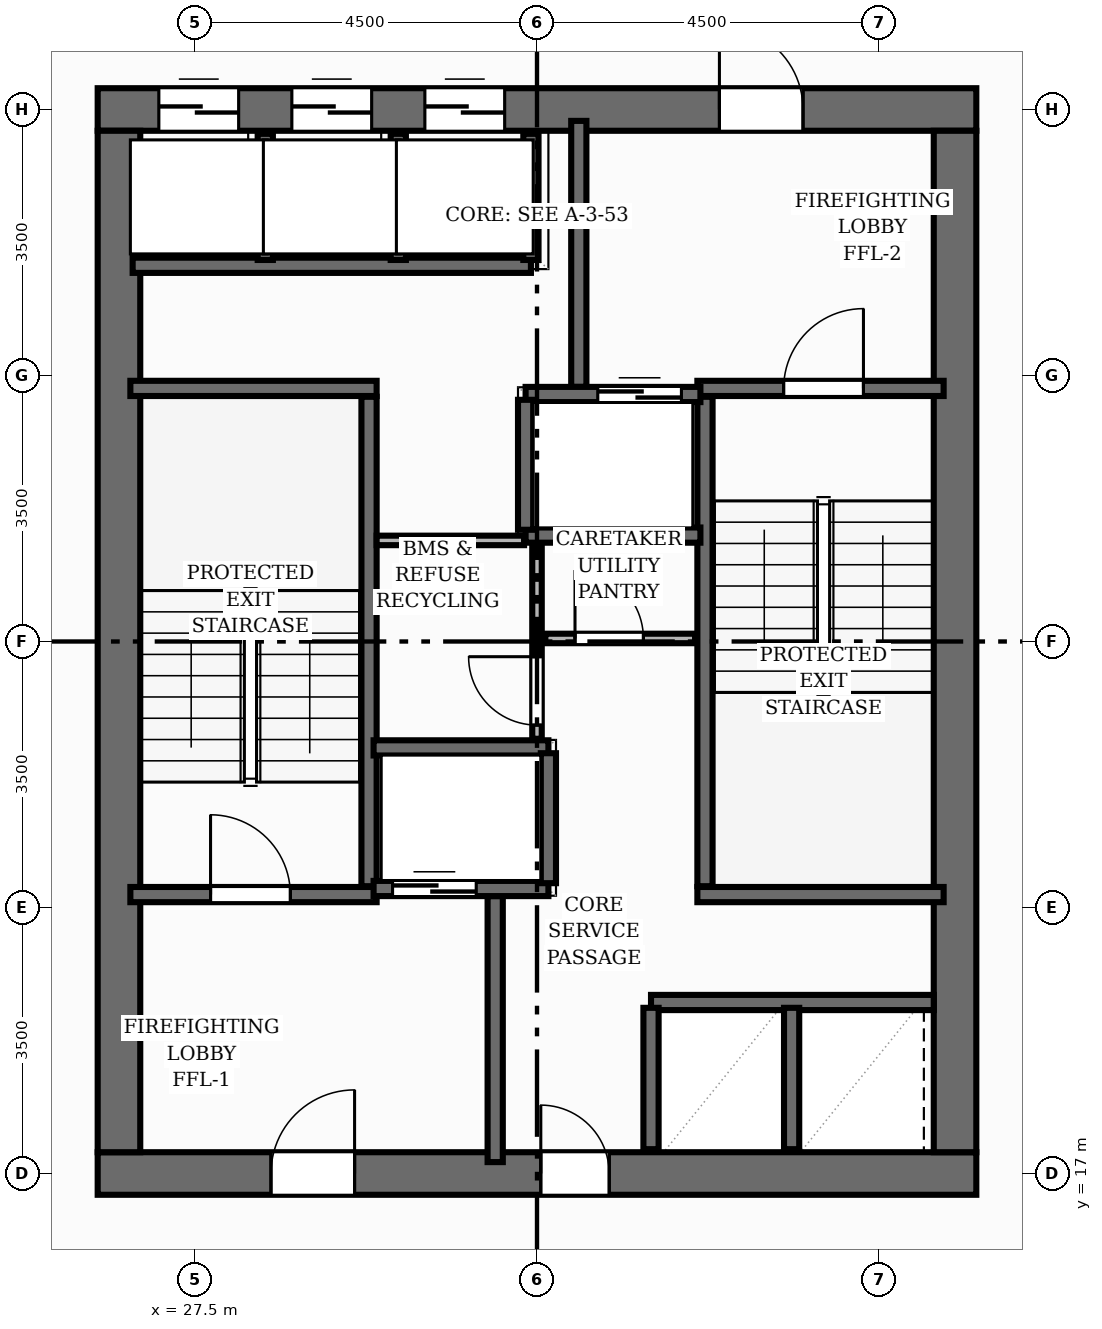
"""IFC4 building model, lengths in metres.
Left out: names, types, materials, properties, quantities, classifications, styles, units other than length and angle.
Written with IfcOpenShell. Run it as: python <this file> out.ifc"""

import sys

from ifc_helpers import new_model, si_unit, direction, frame, frame_2d, origin, place, context, subcontext, project, spatial, rectangle, extrude, element, fill, save


model = new_model("IFC4")
c1 = context("Model", 3, precision=1e-05, world=origin(), true_north=direction((0.0, 1.0)))
c2 = subcontext(c1, "Body", "Model", "MODEL_VIEW")
j1 = project(units=[si_unit("LENGTHUNIT", "METRE"), si_unit("PLANEANGLEUNIT", "RADIAN")], contexts=[c1])
p1 = place(None, origin())
s1 = spatial("IfcSite", under=j1, at=p1, CompositionType="ELEMENT")
p2 = place(p1, origin())
s2 = spatial("IfcBuilding", under=s1, at=p2, CompositionType="ELEMENT")
p3 = place(p2, frame((0.0, 0.0, 223.84)))
s3 = spatial("IfcBuildingStorey", under=s2, at=p3, CompositionType="ELEMENT", Elevation=223.84)
p4 = place(p3, frame((26.22, 17.0, 0.0), z_axis=(0.0, 0.0, 1.0), x_axis=(1.0, 0.0, 0.0)))
e1 = element("IfcWall", 1, at=p4, inside=s3, PredefinedType="SHEAR", context=c2, shape_type="SweptSolid", body=[
    extrude(rectangle(XDim=11.56, YDim=0.56, at=frame_2d((5.78, 0.0))), origin(), (0.0, 0.0, 1.0), 3.2),
])
p5 = place(p4, frame((2.28, 0.0, 0.0)))
e2 = element("IfcOpeningElement", 2, at=p5, cuts=e1, PredefinedType="OPENING", context=c2, shape_type="SweptSolid", body=[
    extrude(rectangle(XDim=1.1, YDim=2.15, at=frame_2d((0.55, 1.075))), frame((0.0, 0.29, 0.0), z_axis=(0.0, -1.0, 0.0), x_axis=(1.0, 0.0, 0.0)), (0.0, 0.0, 1.0), 0.58),
])
p6 = place(p4, frame((5.83, 0.0, 0.0)))
e3 = element("IfcOpeningElement", 3, at=p6, cuts=e1, PredefinedType="OPENING", context=c2, shape_type="SweptSolid", body=[
    extrude(rectangle(XDim=0.9, YDim=2.1, at=frame_2d((0.45, 1.05))), frame((0.0, 0.29, 0.0), z_axis=(0.0, -1.0, 0.0), x_axis=(1.0, 0.0, 0.0)), (0.0, 0.0, 1.0), 0.58),
])
p7 = place(p3, frame((26.22, 31.0, 0.0), z_axis=(0.0, 0.0, 1.0), x_axis=(1.0, 0.0, 0.0)))
e4 = element("IfcWall", 4, at=p7, inside=s3, PredefinedType="SHEAR", context=c2, shape_type="SweptSolid", body=[
    extrude(rectangle(XDim=11.56, YDim=0.56, at=frame_2d((5.78, 0.0))), origin(), (0.0, 0.0, 1.0), 3.2),
])
p8 = place(p7, frame((8.18, 0.0, 0.0)))
e5 = element("IfcOpeningElement", 5, at=p8, cuts=e4, PredefinedType="OPENING", context=c2, shape_type="SweptSolid", body=[
    extrude(rectangle(XDim=1.1, YDim=2.15, at=frame_2d((0.55, 1.075))), frame((0.0, 0.29, 0.0), z_axis=(0.0, -1.0, 0.0), x_axis=(1.0, 0.0, 0.0)), (0.0, 0.0, 1.0), 0.58),
])
p9 = place(p7, frame((0.805, 0.0, 0.0)))
e6 = element("IfcOpeningElement", 6, at=p9, cuts=e4, PredefinedType="OPENING", context=c2, shape_type="SweptSolid", body=[
    extrude(rectangle(XDim=1.05, YDim=2.15, at=frame_2d((0.525, 1.075))), frame((0.0, 0.29, 0.0), z_axis=(0.0, -1.0, 0.0), x_axis=(1.0, 0.0, 0.0)), (0.0, 0.0, 1.0), 0.58),
])
p10 = place(p7, frame((2.555, 0.0, 0.0)))
e7 = element("IfcOpeningElement", 7, at=p10, cuts=e4, PredefinedType="OPENING", context=c2, shape_type="SweptSolid", body=[
    extrude(rectangle(XDim=1.05, YDim=2.15, at=frame_2d((0.525, 1.075))), frame((0.0, 0.29, 0.0), z_axis=(0.0, -1.0, 0.0), x_axis=(1.0, 0.0, 0.0)), (0.0, 0.0, 1.0), 0.58),
])
p11 = place(p7, frame((4.305, 0.0, 0.0)))
e8 = element("IfcOpeningElement", 8, at=p11, cuts=e4, PredefinedType="OPENING", context=c2, shape_type="SweptSolid", body=[
    extrude(rectangle(XDim=1.05, YDim=2.15, at=frame_2d((0.525, 1.075))), frame((0.0, 0.29, 0.0), z_axis=(0.0, -1.0, 0.0), x_axis=(1.0, 0.0, 0.0)), (0.0, 0.0, 1.0), 0.58),
])
for number, where, z_axis, x_axis in (
    (9, (26.5, 17.28, 0.0), (0.0, 0.0, 1.0), (0.0, 1.0, 0.0)),
    (10, (37.5, 17.28, 0.0), (0.0, 0.0, 1.0), (0.0, 1.0, 0.0)),
):
    element("IfcWall", number, at=place(p3, frame(where, z_axis=z_axis, x_axis=x_axis)), inside=s3, PredefinedType="SHEAR", context=c2, shape_type="SweptSolid", body=[
        extrude(rectangle(XDim=13.44, YDim=0.56, at=frame_2d((6.72, 0.0))), origin(), (0.0, 0.0, 1.0), 3.2),
    ])
p12 = place(p3, frame((29.79, 20.78, 0.0), z_axis=(0.0, 0.0, 1.0), x_axis=(0.0, 1.0, 0.0)))
e11 = element("IfcWall", 11, at=p12, inside=s3, PredefinedType="SHEAR", context=c2, shape_type="SweptSolid", body=[
    extrude(rectangle(XDim=6.44, YDim=0.2, at=frame_2d((3.22, 0.0))), origin(), (0.0, 0.0, 1.0), 3.2),
])
p13 = place(p3, frame((26.65, 27.33, 0.0), z_axis=(0.0, 0.0, 1.0), x_axis=(1.0, 0.0, 0.0)))
e12 = element("IfcWall", 12, at=p13, inside=s3, PredefinedType="SHEAR", context=c2, shape_type="SweptSolid", body=[
    extrude(rectangle(XDim=3.24, YDim=0.2, at=frame_2d((1.62, 0.0))), origin(), (0.0, 0.0, 1.0), 3.2),
])
p14 = place(p3, frame((26.65, 20.67, 0.0), z_axis=(0.0, 0.0, 1.0), x_axis=(1.0, 0.0, 0.0)))
e13 = element("IfcWall", 13, at=p14, inside=s3, PredefinedType="SHEAR", context=c2, shape_type="SweptSolid", body=[
    extrude(rectangle(XDim=3.24, YDim=0.2, at=frame_2d((1.62, 0.0))), origin(), (0.0, 0.0, 1.0), 3.2),
])
p15 = place(p14, frame((1.055, 0.0, 0.0)))
e14 = element("IfcOpeningElement", 14, at=p15, cuts=e13, PredefinedType="OPENING", context=c2, shape_type="SweptSolid", body=[
    extrude(rectangle(XDim=1.05, YDim=2.15, at=frame_2d((0.525, 1.075))), frame((0.0, 0.11, 0.0), z_axis=(0.0, -1.0, 0.0), x_axis=(1.0, 0.0, 0.0)), (0.0, 0.0, 1.0), 0.22),
])
p16 = place(p3, frame((34.21, 20.78, 0.0), z_axis=(0.0, 0.0, 1.0), x_axis=(0.0, 1.0, 0.0)))
e15 = element("IfcWall", 15, at=p16, inside=s3, PredefinedType="SHEAR", context=c2, shape_type="SweptSolid", body=[
    extrude(rectangle(XDim=6.44, YDim=0.2, at=frame_2d((3.22, 0.0))), origin(), (0.0, 0.0, 1.0), 3.2),
])
p17 = place(p3, frame((34.11, 20.67, 0.0), z_axis=(0.0, 0.0, 1.0), x_axis=(1.0, 0.0, 0.0)))
e16 = element("IfcWall", 16, at=p17, inside=s3, PredefinedType="SHEAR", context=c2, shape_type="SweptSolid", body=[
    extrude(rectangle(XDim=3.24, YDim=0.2, at=frame_2d((1.62, 0.0))), origin(), (0.0, 0.0, 1.0), 3.2),
])
p18 = place(p3, frame((34.11, 27.33, 0.0), z_axis=(0.0, 0.0, 1.0), x_axis=(1.0, 0.0, 0.0)))
e17 = element("IfcWall", 17, at=p18, inside=s3, PredefinedType="SHEAR", context=c2, shape_type="SweptSolid", body=[
    extrude(rectangle(XDim=3.24, YDim=0.2, at=frame_2d((1.62, 0.0))), origin(), (0.0, 0.0, 1.0), 3.2),
])
p19 = place(p18, frame((1.135, 0.0, 0.0)))
e18 = element("IfcOpeningElement", 18, at=p19, cuts=e17, PredefinedType="OPENING", context=c2, shape_type="SweptSolid", body=[
    extrude(rectangle(XDim=1.05, YDim=2.15, at=frame_2d((0.525, 1.075))), frame((0.0, 0.11, 0.0), z_axis=(0.0, -1.0, 0.0), x_axis=(1.0, 0.0, 0.0)), (0.0, 0.0, 1.0), 0.22),
])
for number, where, z_axis, x_axis in (
    (19, (31.45, 17.15, 0.0), (0.0, 0.0, 1.0), (0.0, 1.0, 0.0)),
    (20, (32.55, 27.35, 0.0), (0.0, 0.0, 1.0), (0.0, 1.0, 0.0)),
):
    element("IfcWall", number, at=place(p3, frame(where, z_axis=z_axis, x_axis=x_axis)), inside=s3, PredefinedType="SHEAR", context=c2, shape_type="SweptSolid", body=[
        extrude(rectangle(XDim=3.5, YDim=0.2, at=frame_2d((1.75, 0.0))), origin(), (0.0, 0.0, 1.0), 3.2),
    ])
p20 = place(p3, frame((29.85, 20.75, 0.0), z_axis=(0.0, 0.0, 1.0), x_axis=(1.0, 0.0, 0.0)))
e21 = element("IfcWall", 21, at=p20, inside=s3, PredefinedType="SHEAR", context=c2, shape_type="SweptSolid", body=[
    extrude(rectangle(XDim=2.3, YDim=0.2, at=frame_2d((1.15, 0.0))), origin(), (0.0, 0.0, 1.0), 3.2),
])
p21 = place(p20, frame((0.25, 0.0, 0.0)))
e22 = element("IfcOpeningElement", 22, at=p21, cuts=e21, PredefinedType="OPENING", context=c2, shape_type="SweptSolid", body=[
    extrude(rectangle(XDim=1.1, YDim=2.15, at=frame_2d((0.55, 1.075))), frame((0.0, 0.11, 0.0), z_axis=(0.0, -1.0, 0.0), x_axis=(1.0, 0.0, 0.0)), (0.0, 0.0, 1.0), 0.22),
])
p22 = place(p3, frame((29.85, 22.6, 0.0), z_axis=(0.0, 0.0, 1.0), x_axis=(1.0, 0.0, 0.0)))
e23 = element("IfcWall", 23, at=p22, inside=s3, PredefinedType="SHEAR", context=c2, shape_type="SweptSolid", body=[
    extrude(rectangle(XDim=2.3, YDim=0.2, at=frame_2d((1.15, 0.0))), origin(), (0.0, 0.0, 1.0), 3.2),
])
p23 = place(p3, frame((32.15, 20.82, 0.0), z_axis=(0.0, 0.0, 1.0), x_axis=(0.0, 1.0, 0.0)))
e24 = element("IfcWall", 24, at=p23, inside=s3, PredefinedType="SHEAR", context=c2, shape_type="SweptSolid", body=[
    extrude(rectangle(XDim=1.71, YDim=0.2, at=frame_2d((0.855, 0.0))), origin(), (0.0, 0.0, 1.0), 3.2),
])
p24 = place(p3, frame((31.85, 27.25, 0.0), z_axis=(0.0, 0.0, 1.0), x_axis=(1.0, 0.0, 0.0)))
e25 = element("IfcWall", 25, at=p24, inside=s3, PredefinedType="SHEAR", context=c2, shape_type="SweptSolid", body=[
    extrude(rectangle(XDim=2.3, YDim=0.2, at=frame_2d((1.15, 0.0))), origin(), (0.0, 0.0, 1.0), 3.2),
])
p25 = place(p24, frame((0.95, 0.0, 0.0)))
e26 = element("IfcOpeningElement", 26, at=p25, cuts=e25, PredefinedType="OPENING", context=c2, shape_type="SweptSolid", body=[
    extrude(rectangle(XDim=1.1, YDim=2.15, at=frame_2d((0.55, 1.075))), frame((0.0, 0.11, 0.0), z_axis=(0.0, -1.0, 0.0), x_axis=(1.0, 0.0, 0.0)), (0.0, 0.0, 1.0), 0.22),
])
p26 = place(p3, frame((31.85, 25.4, 0.0), z_axis=(0.0, 0.0, 1.0), x_axis=(1.0, 0.0, 0.0)))
e27 = element("IfcWall", 27, at=p26, inside=s3, PredefinedType="SHEAR", context=c2, shape_type="SweptSolid", body=[
    extrude(rectangle(XDim=2.3, YDim=0.2, at=frame_2d((1.15, 0.0))), origin(), (0.0, 0.0, 1.0), 3.2),
])
p27 = place(p3, frame((31.85, 25.47, 0.0), z_axis=(0.0, 0.0, 1.0), x_axis=(0.0, 1.0, 0.0)))
e28 = element("IfcWall", 28, at=p27, inside=s3, PredefinedType="SHEAR", context=c2, shape_type="SweptSolid", body=[
    extrude(rectangle(XDim=1.71, YDim=0.2, at=frame_2d((0.855, 0.0))), origin(), (0.0, 0.0, 1.0), 3.2),
])
p28 = place(p3, frame((26.68, 28.95, 0.0), z_axis=(0.0, 0.0, 1.0), x_axis=(1.0, 0.0, 0.0)))
e29 = element("IfcWall", 29, at=p28, inside=s3, PredefinedType="SHEAR", context=c2, shape_type="SweptSolid", body=[
    extrude(rectangle(XDim=5.24, YDim=0.2, at=frame_2d((2.62, 0.0))), origin(), (0.0, 0.0, 1.0), 3.2),
])
for number, where, z_axis, x_axis in (
    (30, (31.92, 29.02, 0.0), (0.0, 0.0, 1.0), (0.0, 1.0, 0.0)),
    (31, (28.425, 29.02, 0.0), (0.0, 0.0, 1.0), (0.0, 1.0, 0.0)),
    (32, (30.175, 29.02, 0.0), (0.0, 0.0, 1.0), (0.0, 1.0, 0.0)),
):
    element("IfcWall", number, at=place(p3, frame(where, z_axis=z_axis, x_axis=x_axis)), inside=s3, PredefinedType="SHEAR", context=c2, shape_type="SweptSolid", body=[
        extrude(rectangle(XDim=1.66, YDim=0.2, at=frame_2d((0.83, 0.0))), origin(), (0.0, 0.0, 1.0), 3.2),
    ])
p29 = place(p3, frame((33.5, 19.25, 0.0), z_axis=(0.0, 0.0, 1.0), x_axis=(1.0, 0.0, 0.0)))
e33 = element("IfcWall", 33, at=p29, inside=s3, PredefinedType="SHEAR", context=c2, shape_type="SweptSolid", body=[
    extrude(rectangle(XDim=3.72, YDim=0.2, at=frame_2d((1.86, 0.0))), origin(), (0.0, 0.0, 1.0), 3.2),
])
for number, where, z_axis, x_axis in (
    (34, (33.5, 17.32, 0.0), (0.0, 0.0, 1.0), (0.0, 1.0, 0.0)),
    (35, (35.35, 17.32, 0.0), (0.0, 0.0, 1.0), (0.0, 1.0, 0.0)),
):
    element("IfcWall", number, at=place(p3, frame(where, z_axis=z_axis, x_axis=x_axis)), inside=s3, PredefinedType="SHEAR", context=c2, shape_type="SweptSolid", body=[
        extrude(rectangle(XDim=1.86, YDim=0.2, at=frame_2d((0.93, 0.0))), origin(), (0.0, 0.0, 1.0), 3.2),
    ])
p30 = place(p3, frame((32.0, 22.72, 0.0), z_axis=(0.0, 0.0, 1.0), x_axis=(0.0, 1.0, 0.0)))
e36 = element("IfcWall", 36, at=p30, inside=s3, PredefinedType="PARTITIONING", context=c2, shape_type="SweptSolid", body=[
    extrude(rectangle(XDim=2.52, YDim=0.125, at=frame_2d((1.26, 0.0))), origin(), (0.0, 0.0, 1.0), 2.955),
])
p31 = place(p30, frame((0.18, 0.0, 0.0)))
e37 = element("IfcOpeningElement", 37, at=p31, cuts=e36, PredefinedType="OPENING", context=c2, shape_type="SweptSolid", body=[
    extrude(rectangle(XDim=0.9, YDim=2.1, at=frame_2d((0.45, 1.05))), frame((0.0, 0.073, 0.0), z_axis=(0.0, -1.0, 0.0), x_axis=(1.0, 0.0, 0.0)), (0.0, 0.0, 1.0), 0.145),
])
p32 = place(p3, frame((32.11, 24.04, 0.0), z_axis=(0.0, 0.0, 1.0), x_axis=(1.0, 0.0, 0.0)))
e38 = element("IfcWall", 38, at=p32, inside=s3, PredefinedType="PARTITIONING", context=c2, shape_type="SweptSolid", body=[
    extrude(rectangle(XDim=1.97, YDim=0.125, at=frame_2d((0.985, 0.0))), origin(), (0.0, 0.0, 1.0), 2.955),
])
p33 = place(p32, frame((0.39, 0.0, 0.0)))
e39 = element("IfcOpeningElement", 39, at=p33, cuts=e38, PredefinedType="OPENING", context=c2, shape_type="SweptSolid", body=[
    extrude(rectangle(XDim=0.9, YDim=2.1, at=frame_2d((0.45, 1.05))), frame((0.0, 0.073, 0.0), z_axis=(0.0, -1.0, 0.0), x_axis=(1.0, 0.0, 0.0)), (0.0, 0.0, 1.0), 0.145),
])
p34 = place(p3, frame((29.89, 25.33, 0.0), z_axis=(0.0, 0.0, 1.0), x_axis=(1.0, 0.0, 0.0)))
e40 = element("IfcWall", 40, at=p34, inside=s3, PredefinedType="PARTITIONING", context=c2, shape_type="SweptSolid", body=[
    extrude(rectangle(XDim=1.94, YDim=0.125, at=frame_2d((0.97, 0.0))), origin(), (0.0, 0.0, 1.0), 2.955),
])
p35 = place(p15, origin())
e41 = element("IfcDoor", 41, at=p35, inside=s3, OperationType="SINGLE_SWING_LEFT", PredefinedType="DOOR", context=c2, shape_type="SweptSolid", body=[
    extrude(rectangle(XDim=1.05, YDim=2.15, at=frame_2d((0.525, 1.075))), frame((0.0, 0.025, 0.0), z_axis=(0.0, -1.0, 0.0), x_axis=(1.0, 0.0, 0.0)), (0.0, 0.0, 1.0), 0.05),
])
fill(e14, e41)
p36 = place(p19, origin())
e42 = element("IfcDoor", 42, at=p36, inside=s3, OperationType="SINGLE_SWING_RIGHT", PredefinedType="DOOR", context=c2, shape_type="SweptSolid", body=[
    extrude(rectangle(XDim=1.05, YDim=2.15, at=frame_2d((0.525, 1.075))), frame((0.0, 0.025, 0.0), z_axis=(0.0, -1.0, 0.0), x_axis=(1.0, 0.0, 0.0)), (0.0, 0.0, 1.0), 0.05),
])
fill(e18, e42)
p37 = place(p5, origin())
e43 = element("IfcDoor", 43, at=p37, inside=s3, OperationType="SINGLE_SWING_RIGHT", PredefinedType="DOOR", context=c2, shape_type="SweptSolid", body=[
    extrude(rectangle(XDim=1.1, YDim=2.15, at=frame_2d((0.55, 1.075))), frame((0.0, 0.025, 0.0), z_axis=(0.0, -1.0, 0.0), x_axis=(1.0, 0.0, 0.0)), (0.0, 0.0, 1.0), 0.05),
])
fill(e2, e43)
p38 = place(p8, origin())
e44 = element("IfcDoor", 44, at=p38, inside=s3, OperationType="SINGLE_SWING_LEFT", PredefinedType="DOOR", context=c2, shape_type="SweptSolid", body=[
    extrude(rectangle(XDim=1.1, YDim=2.15, at=frame_2d((0.55, 1.075))), frame((0.0, 0.025, 0.0), z_axis=(0.0, -1.0, 0.0), x_axis=(1.0, 0.0, 0.0)), (0.0, 0.0, 1.0), 0.05),
])
fill(e5, e44)
p39 = place(p21, origin())
e45 = element("IfcDoor", 45, at=p39, inside=s3, OperationType="DOUBLE_DOOR_SLIDING", PredefinedType="DOOR", context=c2, shape_type="SweptSolid", body=[
    extrude(rectangle(XDim=1.1, YDim=2.15, at=frame_2d((0.55, 1.075))), frame((0.0, 0.025, 0.0), z_axis=(0.0, -1.0, 0.0), x_axis=(1.0, 0.0, 0.0)), (0.0, 0.0, 1.0), 0.05),
])
fill(e22, e45)
p40 = place(p25, origin())
e46 = element("IfcDoor", 46, at=p40, inside=s3, OperationType="DOUBLE_DOOR_SLIDING", PredefinedType="DOOR", context=c2, shape_type="SweptSolid", body=[
    extrude(rectangle(XDim=1.1, YDim=2.15, at=frame_2d((0.55, 1.075))), frame((0.0, 0.025, 0.0), z_axis=(0.0, -1.0, 0.0), x_axis=(1.0, 0.0, 0.0)), (0.0, 0.0, 1.0), 0.05),
])
fill(e26, e46)
p41 = place(p9, origin())
e47 = element("IfcDoor", 47, at=p41, inside=s3, OperationType="DOUBLE_DOOR_SLIDING", PredefinedType="DOOR", context=c2, shape_type="SweptSolid", body=[
    extrude(rectangle(XDim=1.05, YDim=2.15, at=frame_2d((0.525, 1.075))), frame((0.0, 0.025, 0.0), z_axis=(0.0, -1.0, 0.0), x_axis=(1.0, 0.0, 0.0)), (0.0, 0.0, 1.0), 0.05),
])
fill(e6, e47)
p42 = place(p10, origin())
e48 = element("IfcDoor", 48, at=p42, inside=s3, OperationType="DOUBLE_DOOR_SLIDING", PredefinedType="DOOR", context=c2, shape_type="SweptSolid", body=[
    extrude(rectangle(XDim=1.05, YDim=2.15, at=frame_2d((0.525, 1.075))), frame((0.0, 0.025, 0.0), z_axis=(0.0, -1.0, 0.0), x_axis=(1.0, 0.0, 0.0)), (0.0, 0.0, 1.0), 0.05),
])
fill(e7, e48)
p43 = place(p11, origin())
e49 = element("IfcDoor", 49, at=p43, inside=s3, OperationType="DOUBLE_DOOR_SLIDING", PredefinedType="DOOR", context=c2, shape_type="SweptSolid", body=[
    extrude(rectangle(XDim=1.05, YDim=2.15, at=frame_2d((0.525, 1.075))), frame((0.0, 0.025, 0.0), z_axis=(0.0, -1.0, 0.0), x_axis=(1.0, 0.0, 0.0)), (0.0, 0.0, 1.0), 0.05),
])
fill(e8, e49)
p44 = place(p6, origin())
e50 = element("IfcDoor", 50, at=p44, inside=s3, OperationType="SINGLE_SWING_LEFT", PredefinedType="DOOR", context=c2, shape_type="SweptSolid", body=[
    extrude(rectangle(XDim=0.9, YDim=2.1, at=frame_2d((0.45, 1.05))), frame((0.0, 0.025, 0.0), z_axis=(0.0, -1.0, 0.0), x_axis=(1.0, 0.0, 0.0)), (0.0, 0.0, 1.0), 0.05),
])
fill(e3, e50)
p45 = place(p33, origin())
e51 = element("IfcDoor", 51, at=p45, inside=s3, OperationType="SINGLE_SWING_LEFT", PredefinedType="DOOR", context=c2, shape_type="SweptSolid", body=[
    extrude(rectangle(XDim=0.9, YDim=2.1, at=frame_2d((0.45, 1.05))), frame((0.0, 0.025, 0.0), z_axis=(0.0, -1.0, 0.0), x_axis=(1.0, 0.0, 0.0)), (0.0, 0.0, 1.0), 0.05),
])
fill(e39, e51)
p46 = place(p31, origin())
e52 = element("IfcDoor", 52, at=p46, inside=s3, OperationType="SINGLE_SWING_RIGHT", PredefinedType="DOOR", context=c2, shape_type="SweptSolid", body=[
    extrude(rectangle(XDim=0.9, YDim=2.1, at=frame_2d((0.45, 1.05))), frame((0.0, 0.025, 0.0), z_axis=(0.0, -1.0, 0.0), x_axis=(1.0, 0.0, 0.0)), (0.0, 0.0, 1.0), 0.05),
])
fill(e37, e52)
save(model, sys.argv[1])
